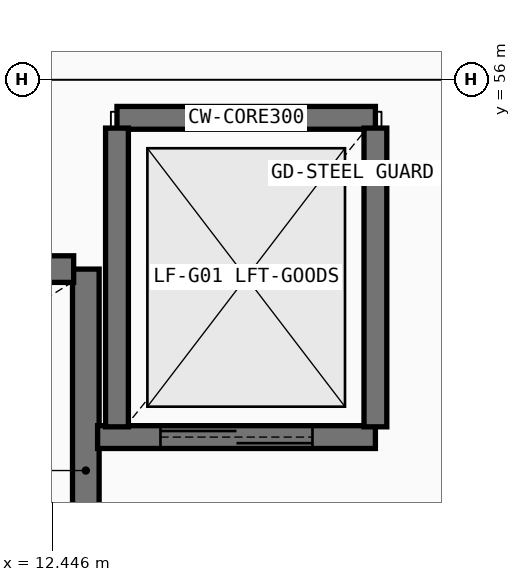
"""IFC4 building model, lengths in metres.
Left out: names, types, materials, properties, quantities, classifications, styles, units other than length and angle.
Written with IfcOpenShell. Run it as: python <this file> out.ifc"""

import sys

from ifc_helpers import new_model, si_unit, direction, frame, frame_2d, origin, place, context, subcontext, project, spatial, rectangle, extrude, element, fill, save


model = new_model("IFC4")
c1 = context("Model", 3, precision=1e-05, world=origin(), true_north=direction((0.0, 1.0)))
c2 = subcontext(c1, "Body", "Model", "MODEL_VIEW")
j1 = project(units=[si_unit("LENGTHUNIT", "METRE"), si_unit("PLANEANGLEUNIT", "RADIAN")], contexts=[c1])
p1 = place(None, origin())
s1 = spatial("IfcSite", under=j1, at=p1, CompositionType="ELEMENT")
p2 = place(p1, origin())
s2 = spatial("IfcBuilding", under=s1, at=p2, CompositionType="ELEMENT")
p3 = place(p2, frame((0.0, 0.0, 6.0)))
s3 = spatial("IfcBuildingStorey", under=s2, at=p3, CompositionType="ELEMENT", Elevation=6.0)
p4 = place(p3, frame((12.89, 48.21, 0.0), z_axis=(0.0, 0.0, 1.0), x_axis=(0.0, 1.0, 0.0)))
e1 = element("IfcWall", 1, at=p4, inside=s3, PredefinedType="SHEAR", context=c2, shape_type="SweptSolid", body=[
    extrude(rectangle(XDim=5.3, YDim=0.35, at=frame_2d((2.65, 0.0))), origin(), (0.0, 0.0, 1.0), 5.17),
])
p5 = place(p3, frame((12.73, 53.51, 0.0), z_axis=(0.0, 0.0, 1.0), x_axis=(-1.0, 0.0, 0.0)))
e2 = element("IfcWall", 2, at=p5, inside=s3, PredefinedType="SHEAR", context=c2, shape_type="SweptSolid", body=[
    extrude(rectangle(XDim=10.88, YDim=0.35, at=frame_2d((5.44, 0.0))), origin(), (0.0, 0.0, 1.0), 5.17),
])
p6 = place(p3, frame((16.7, 55.5, 0.0), z_axis=(0.0, 0.0, 1.0), x_axis=(-1.0, 0.0, 0.0)))
e3 = element("IfcWall", 3, at=p6, inside=s3, PredefinedType="SHEAR", context=c2, shape_type="SweptSolid", body=[
    extrude(rectangle(XDim=3.4, YDim=0.3, at=frame_2d((1.7, 0.0))), origin(), (0.0, 0.0, 1.0), 5.17),
])
p7 = place(p3, frame((13.045, 51.3, 0.0), z_axis=(0.0, 0.0, 1.0), x_axis=(1.0, 0.0, 0.0)))
e4 = element("IfcWall", 4, at=p7, inside=s3, PredefinedType="SHEAR", context=c2, shape_type="SweptSolid", body=[
    extrude(rectangle(XDim=3.655, YDim=0.3, at=frame_2d((1.828, 0.0))), origin(), (0.0, 0.0, 1.0), 5.17),
])
p8 = place(p7, frame((0.827, 0.0, 0.0)))
e5 = element("IfcOpeningElement", 5, at=p8, cuts=e4, PredefinedType="OPENING", context=c2, shape_type="SweptSolid", body=[
    extrude(rectangle(XDim=2.0, YDim=2.5, at=frame_2d((1.0, 1.25))), frame((0.0, 0.16, 0.0), z_axis=(0.0, -1.0, 0.0), x_axis=(1.0, 0.0, 0.0)), (0.0, 0.0, 1.0), 0.32),
])
for number, where, z_axis, x_axis in (
    (6, (16.7, 51.435, 0.0), (0.0, 0.0, 1.0), (0.0, 1.0, 0.0)),
    (7, (13.3, 55.365, 0.0), (0.0, 0.0, 1.0), (0.0, -1.0, 0.0)),
):
    element("IfcWall", number, at=place(p3, frame(where, z_axis=z_axis, x_axis=x_axis)), inside=s3, PredefinedType="SHEAR", context=c2, shape_type="SweptSolid", body=[
        extrude(rectangle(XDim=3.93, YDim=0.3, at=frame_2d((1.965, 0.0))), origin(), (0.0, 0.0, 1.0), 5.17),
    ])
p9 = place(p8, origin())
e8 = element("IfcDoor", 8, at=p9, inside=s3, OperationType="DOUBLE_DOOR_SLIDING", PredefinedType="DOOR", context=c2, shape_type="SweptSolid", body=[
    extrude(rectangle(XDim=2.0, YDim=2.5, at=frame_2d((1.0, 1.25))), frame((0.0, 0.025, 0.0), z_axis=(0.0, -1.0, 0.0), x_axis=(1.0, 0.0, 0.0)), (0.0, 0.0, 1.0), 0.05),
])
fill(e5, e8)
save(model, sys.argv[1])
